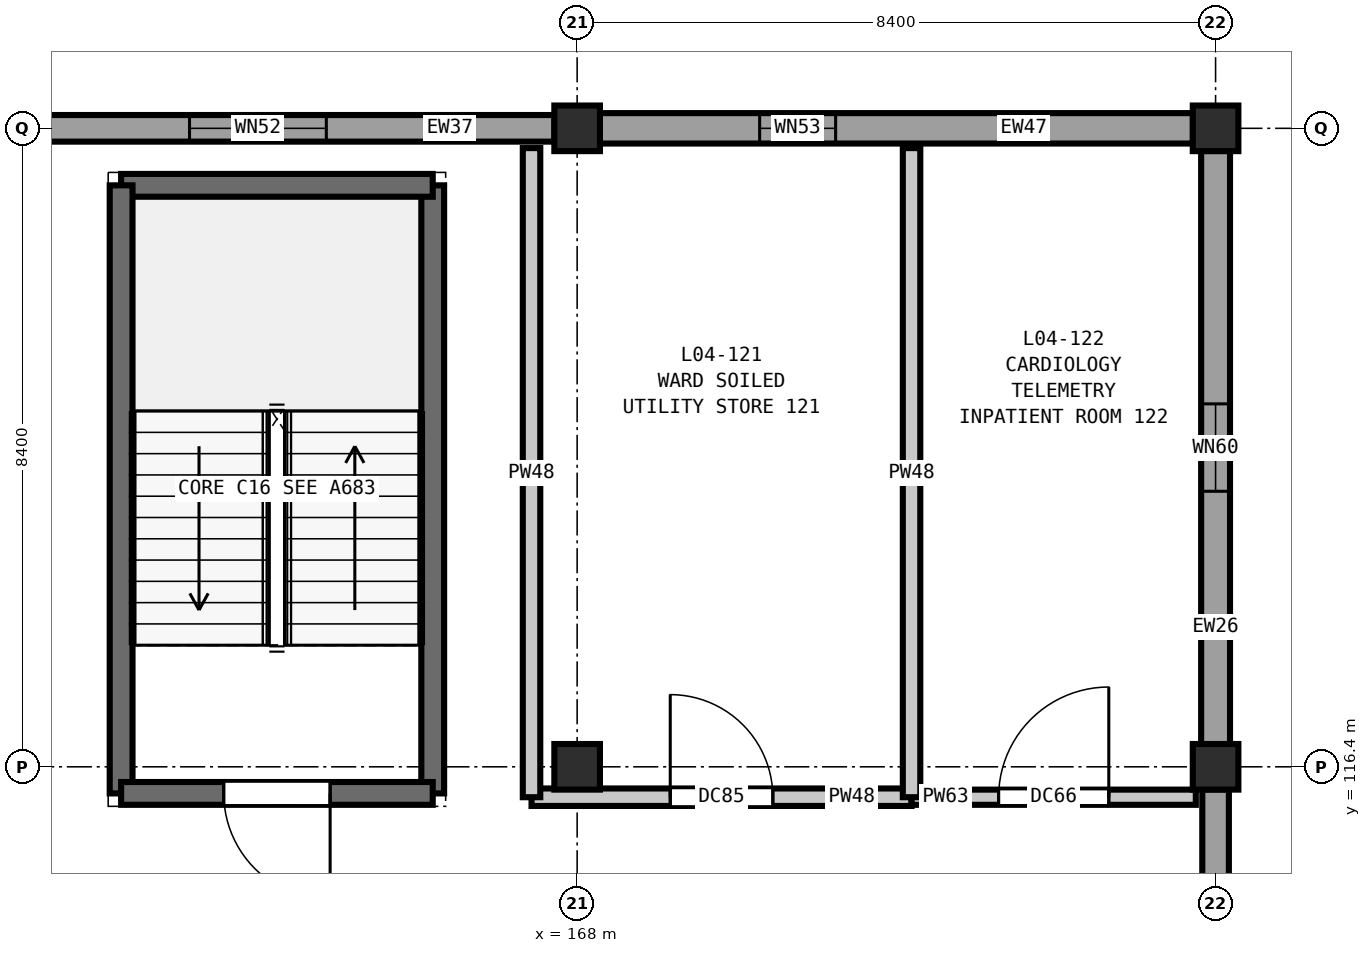
"""IFC4 building model, lengths in metres.
Left out: names, types, materials, properties, quantities, classifications, styles, units other than length and angle.
Written with IfcOpenShell. Run it as: python <this file> out.ifc"""

import sys

from ifc_helpers import new_model, si_unit, direction, frame, frame_2d, origin, origin_2d, place, context, subcontext, project, spatial, rectangle, extrude, element, fill, save


model = new_model("IFC4")
c1 = context("Model", 3, precision=1e-05, world=origin(), true_north=direction((0.0, 1.0)))
c2 = subcontext(c1, "Body", "Model", "MODEL_VIEW")
j1 = project(units=[si_unit("LENGTHUNIT", "METRE"), si_unit("PLANEANGLEUNIT", "RADIAN")], contexts=[c1])
p1 = place(None, origin())
s1 = spatial("IfcSite", under=j1, at=p1, CompositionType="ELEMENT")
p2 = place(p1, origin())
s2 = spatial("IfcBuilding", under=s1, at=p2, CompositionType="ELEMENT")
p3 = place(p2, frame((0.0, 0.0, 20.4)))
s3 = spatial("IfcBuildingStorey", under=s2, at=p3, CompositionType="ELEMENT", Elevation=20.4)
for number, where, z_axis, x_axis in (
    (1, (168.0, 116.4, 0.0), (0.0, 0.0, 1.0), (1.0, 0.0, 0.0)),
    (2, (168.0, 124.8, 0.0), (0.0, 0.0, 1.0), (1.0, 0.0, 0.0)),
    (3, (176.4, 116.4, 0.0), (0.0, 0.0, 1.0), (1.0, 0.0, 0.0)),
    (4, (176.4, 124.8, 0.0), (0.0, 0.0, 1.0), (1.0, 0.0, 0.0)),
):
    element("IfcColumn", number, at=place(p3, frame(where, z_axis=z_axis, x_axis=x_axis)), inside=s3, PredefinedType="COLUMN", context=c2, shape_type="SweptSolid", body=[
        extrude(rectangle(XDim=0.6, YDim=0.6, at=origin_2d()), origin(), (0.0, 0.0, 1.0), 4.2),
    ])
p4 = place(p3, frame((159.898, 124.8, 0.0), z_axis=(0.0, 0.0, 1.0), x_axis=(1.0, 0.0, 0.0)))
e5 = element("IfcWall", 5, at=p4, inside=s3, PredefinedType="SOLIDWALL", context=c2, shape_type="SweptSolid", body=[
    extrude(rectangle(XDim=7.804, YDim=0.35, at=frame_2d((3.902, 0.0))), origin(), (0.0, 0.0, 1.0), 3.48),
])
p5 = place(p4, frame((3.002, 0.0, 0.9)))
e6 = element("IfcOpeningElement", 6, at=p5, cuts=e5, PredefinedType="OPENING", context=c2, shape_type="SweptSolid", body=[
    extrude(rectangle(XDim=1.8, YDim=1.55, at=frame_2d((0.9, 0.775))), frame((0.0, 0.185, 0.0), z_axis=(0.0, -1.0, 0.0), x_axis=(1.0, 0.0, 0.0)), (0.0, 0.0, 1.0), 0.37),
])
p6 = place(p3, frame((168.298, 124.8, 0.0), z_axis=(0.0, 0.0, 1.0), x_axis=(1.0, 0.0, 0.0)))
e7 = element("IfcWall", 7, at=p6, inside=s3, PredefinedType="SOLIDWALL", context=c2, shape_type="SweptSolid", body=[
    extrude(rectangle(XDim=7.804, YDim=0.4, at=frame_2d((3.902, 0.0))), origin(), (0.0, 0.0, 1.0), 3.48),
])
p7 = place(p6, frame((2.103, 0.0, 0.9)))
e8 = element("IfcOpeningElement", 8, at=p7, cuts=e7, PredefinedType="OPENING", context=c2, shape_type="SweptSolid", body=[
    extrude(rectangle(XDim=1.0, YDim=1.75, at=frame_2d((0.5, 0.875))), frame((0.0, 0.21, 0.0), z_axis=(0.0, -1.0, 0.0), x_axis=(1.0, 0.0, 0.0)), (0.0, 0.0, 1.0), 0.42),
])
p8 = place(p3, frame((176.4, 124.502, 0.0), z_axis=(0.0, 0.0, 1.0), x_axis=(0.0, -1.0, 0.0)))
e9 = element("IfcWall", 9, at=p8, inside=s3, PredefinedType="SOLIDWALL", context=c2, shape_type="SweptSolid", body=[
    extrude(rectangle(XDim=7.804, YDim=0.38, at=frame_2d((3.902, 0.0))), origin(), (0.0, 0.0, 1.0), 3.48),
])
p9 = place(p8, frame((3.327, 0.0, 0.9)))
e10 = element("IfcOpeningElement", 10, at=p9, cuts=e9, PredefinedType="OPENING", context=c2, shape_type="SweptSolid", body=[
    extrude(rectangle(XDim=1.15, YDim=1.75, at=frame_2d((0.575, 0.875))), frame((0.0, 0.2, 0.0), z_axis=(0.0, -1.0, 0.0), x_axis=(1.0, 0.0, 0.0)), (0.0, 0.0, 1.0), 0.4),
])
p10 = place(p3, frame((176.4, 116.102, 0.0), z_axis=(0.0, 0.0, 1.0), x_axis=(0.0, -1.0, 0.0)))
e11 = element("IfcWall", 11, at=p10, inside=s3, PredefinedType="SOLIDWALL", context=c2, shape_type="SweptSolid", body=[
    extrude(rectangle(XDim=6.604, YDim=0.35, at=frame_2d((3.302, 0.0))), origin(), (0.0, 0.0, 1.0), 3.48),
])
p11 = place(p10, frame((3.621, 0.0, 0.9)))
e12 = element("IfcOpeningElement", 12, at=p11, cuts=e11, PredefinedType="OPENING", context=c2, shape_type="SweptSolid", body=[
    extrude(rectangle(XDim=1.3, YDim=1.75, at=frame_2d((0.65, 0.875))), frame((0.0, 0.185, 0.0), z_axis=(0.0, -1.0, 0.0), x_axis=(1.0, 0.0, 0.0)), (0.0, 0.0, 1.0), 0.37),
])
p12 = place(p3, frame((166.1, 116.05, 0.0), z_axis=(0.0, 0.0, 1.0), x_axis=(0.0, 1.0, 0.0)))
e13 = element("IfcWall", 13, at=p12, inside=s3, PredefinedType="SHEAR", context=c2, shape_type="SweptSolid", body=[
    extrude(rectangle(XDim=8.0, YDim=0.3, at=frame_2d((4.0, 0.0))), origin(), (0.0, 0.0, 1.0), 4.2),
])
p13 = place(p3, frame((166.1, 124.05, 0.0), z_axis=(0.0, 0.0, 1.0), x_axis=(-1.0, 0.0, 0.0)))
e14 = element("IfcWall", 14, at=p13, inside=s3, PredefinedType="SHEAR", context=c2, shape_type="SweptSolid", body=[
    extrude(rectangle(XDim=4.1, YDim=0.3, at=frame_2d((2.05, 0.0))), origin(), (0.0, 0.0, 1.0), 4.2),
])
p14 = place(p3, frame((162.0, 124.05, 0.0), z_axis=(0.0, 0.0, 1.0), x_axis=(0.0, -1.0, 0.0)))
e15 = element("IfcWall", 15, at=p14, inside=s3, PredefinedType="SHEAR", context=c2, shape_type="SweptSolid", body=[
    extrude(rectangle(XDim=8.0, YDim=0.3, at=frame_2d((4.0, 0.0))), origin(), (0.0, 0.0, 1.0), 4.2),
])
p15 = place(p3, frame((162.0, 116.05, 0.0), z_axis=(0.0, 0.0, 1.0), x_axis=(1.0, 0.0, 0.0)))
e16 = element("IfcWall", 16, at=p15, inside=s3, PredefinedType="SHEAR", context=c2, shape_type="SweptSolid", body=[
    extrude(rectangle(XDim=4.1, YDim=0.3, at=frame_2d((2.05, 0.0))), origin(), (0.0, 0.0, 1.0), 4.2),
])
p16 = place(p15, frame((1.35, 0.0, 0.0)))
e17 = element("IfcOpeningElement", 17, at=p16, cuts=e16, PredefinedType="OPENING", context=c2, shape_type="SweptSolid", body=[
    extrude(rectangle(XDim=1.4, YDim=2.2, at=frame_2d((0.7, 1.1))), frame((0.0, 0.16, 0.0), z_axis=(0.0, -1.0, 0.0), x_axis=(1.0, 0.0, 0.0)), (0.0, 0.0, 1.0), 0.32),
])
p17 = place(p3, frame((167.4, 116.0, 0.0), z_axis=(0.0, 0.0, 1.0), x_axis=(1.0, 0.0, 0.0)))
e18 = element("IfcWall", 18, at=p17, inside=s3, PredefinedType="PARTITIONING", context=c2, shape_type="SweptSolid", body=[
    extrude(rectangle(XDim=5.0, YDim=0.23, at=frame_2d((2.5, 0.0))), origin(), (0.0, 0.0, 1.0), 3.82),
])
p18 = place(p17, frame((1.825, 0.0, 0.0)))
e19 = element("IfcOpeningElement", 19, at=p18, cuts=e18, PredefinedType="OPENING", context=c2, shape_type="SweptSolid", body=[
    extrude(rectangle(XDim=1.35, YDim=2.2, at=frame_2d((0.675, 1.1))), frame((0.0, 0.125, 0.0), z_axis=(0.0, -1.0, 0.0), x_axis=(1.0, 0.0, 0.0)), (0.0, 0.0, 1.0), 0.25),
])
p19 = place(p3, frame((172.4, 116.0, 0.0), z_axis=(0.0, 0.0, 1.0), x_axis=(1.0, 0.0, 0.0)))
e20 = element("IfcWall", 20, at=p19, inside=s3, PredefinedType="PARTITIONING", context=c2, shape_type="SweptSolid", body=[
    extrude(rectangle(XDim=3.74, YDim=0.2, at=frame_2d((1.87, 0.0))), origin(), (0.0, 0.0, 1.0), 3.82),
])
p20 = place(p19, frame((1.145, 0.0, 0.0)))
e21 = element("IfcOpeningElement", 21, at=p20, cuts=e20, PredefinedType="OPENING", context=c2, shape_type="SweptSolid", body=[
    extrude(rectangle(XDim=1.45, YDim=2.25, at=frame_2d((0.725, 1.125))), frame((0.0, 0.11, 0.0), z_axis=(0.0, -1.0, 0.0), x_axis=(1.0, 0.0, 0.0)), (0.0, 0.0, 1.0), 0.22),
])
for number, where, z_axis, x_axis in (
    (22, (167.4, 116.0, 0.0), (0.0, 0.0, 1.0), (0.0, 1.0, 0.0)),
    (23, (172.4, 116.0, 0.0), (0.0, 0.0, 1.0), (0.0, 1.0, 0.0)),
):
    element("IfcWall", number, at=place(p3, frame(where, z_axis=z_axis, x_axis=x_axis)), inside=s3, PredefinedType="PARTITIONING", context=c2, shape_type="SweptSolid", body=[
        extrude(rectangle(XDim=8.54, YDim=0.23, at=frame_2d((4.27, 0.0))), origin(), (0.0, 0.0, 1.0), 3.82),
    ])
p21 = place(p5, origin())
e24 = element("IfcWindow", 24, at=p21, inside=s3, PartitioningType="DOUBLE_PANEL_VERTICAL", PredefinedType="WINDOW", context=c2, shape_type="SweptSolid", body=[
    extrude(rectangle(XDim=1.8, YDim=1.55, at=frame_2d((0.9, 0.775))), frame((0.0, 0.03, 0.0), z_axis=(0.0, -1.0, 0.0), x_axis=(1.0, 0.0, 0.0)), (0.0, 0.0, 1.0), 0.06),
])
fill(e6, e24)
p22 = place(p7, origin())
e25 = element("IfcWindow", 25, at=p22, inside=s3, PartitioningType="SINGLE_PANEL", PredefinedType="WINDOW", context=c2, shape_type="SweptSolid", body=[
    extrude(rectangle(XDim=1.0, YDim=1.75, at=frame_2d((0.5, 0.875))), frame((0.0, 0.03, 0.0), z_axis=(0.0, -1.0, 0.0), x_axis=(1.0, 0.0, 0.0)), (0.0, 0.0, 1.0), 0.06),
])
fill(e8, e25)
p23 = place(p9, origin())
e26 = element("IfcWindow", 26, at=p23, inside=s3, PartitioningType="SINGLE_PANEL", PredefinedType="WINDOW", context=c2, shape_type="SweptSolid", body=[
    extrude(rectangle(XDim=1.15, YDim=1.75, at=frame_2d((0.575, 0.875))), frame((0.0, 0.03, 0.0), z_axis=(0.0, -1.0, 0.0), x_axis=(1.0, 0.0, 0.0)), (0.0, 0.0, 1.0), 0.06),
])
fill(e10, e26)
p24 = place(p16, frame((1.4, 0.0, 0.0), z_axis=(0.0, 0.0, 1.0), x_axis=(-1.0, 0.0, 0.0)))
e27 = element("IfcDoor", 27, at=p24, inside=s3, OperationType="SINGLE_SWING_LEFT", PredefinedType="DOOR", context=c2, shape_type="SweptSolid", body=[
    extrude(rectangle(XDim=1.4, YDim=2.2, at=frame_2d((0.7, 1.1))), frame((0.0, 0.025, 0.0), z_axis=(0.0, -1.0, 0.0), x_axis=(1.0, 0.0, 0.0)), (0.0, 0.0, 1.0), 0.05),
])
fill(e17, e27)
p25 = place(p18, origin())
e28 = element("IfcDoor", 28, at=p25, inside=s3, OperationType="SINGLE_SWING_LEFT", PredefinedType="DOOR", context=c2, shape_type="SweptSolid", body=[
    extrude(rectangle(XDim=1.35, YDim=2.2, at=frame_2d((0.675, 1.1))), frame((0.0, 0.025, 0.0), z_axis=(0.0, -1.0, 0.0), x_axis=(1.0, 0.0, 0.0)), (0.0, 0.0, 1.0), 0.05),
])
fill(e19, e28)
p26 = place(p20, origin())
e29 = element("IfcDoor", 29, at=p26, inside=s3, OperationType="SINGLE_SWING_RIGHT", PredefinedType="DOOR", context=c2, shape_type="SweptSolid", body=[
    extrude(rectangle(XDim=1.45, YDim=2.25, at=frame_2d((0.725, 1.125))), frame((0.0, 0.025, 0.0), z_axis=(0.0, -1.0, 0.0), x_axis=(1.0, 0.0, 0.0)), (0.0, 0.0, 1.0), 0.05),
])
fill(e21, e29)
save(model, sys.argv[1])
